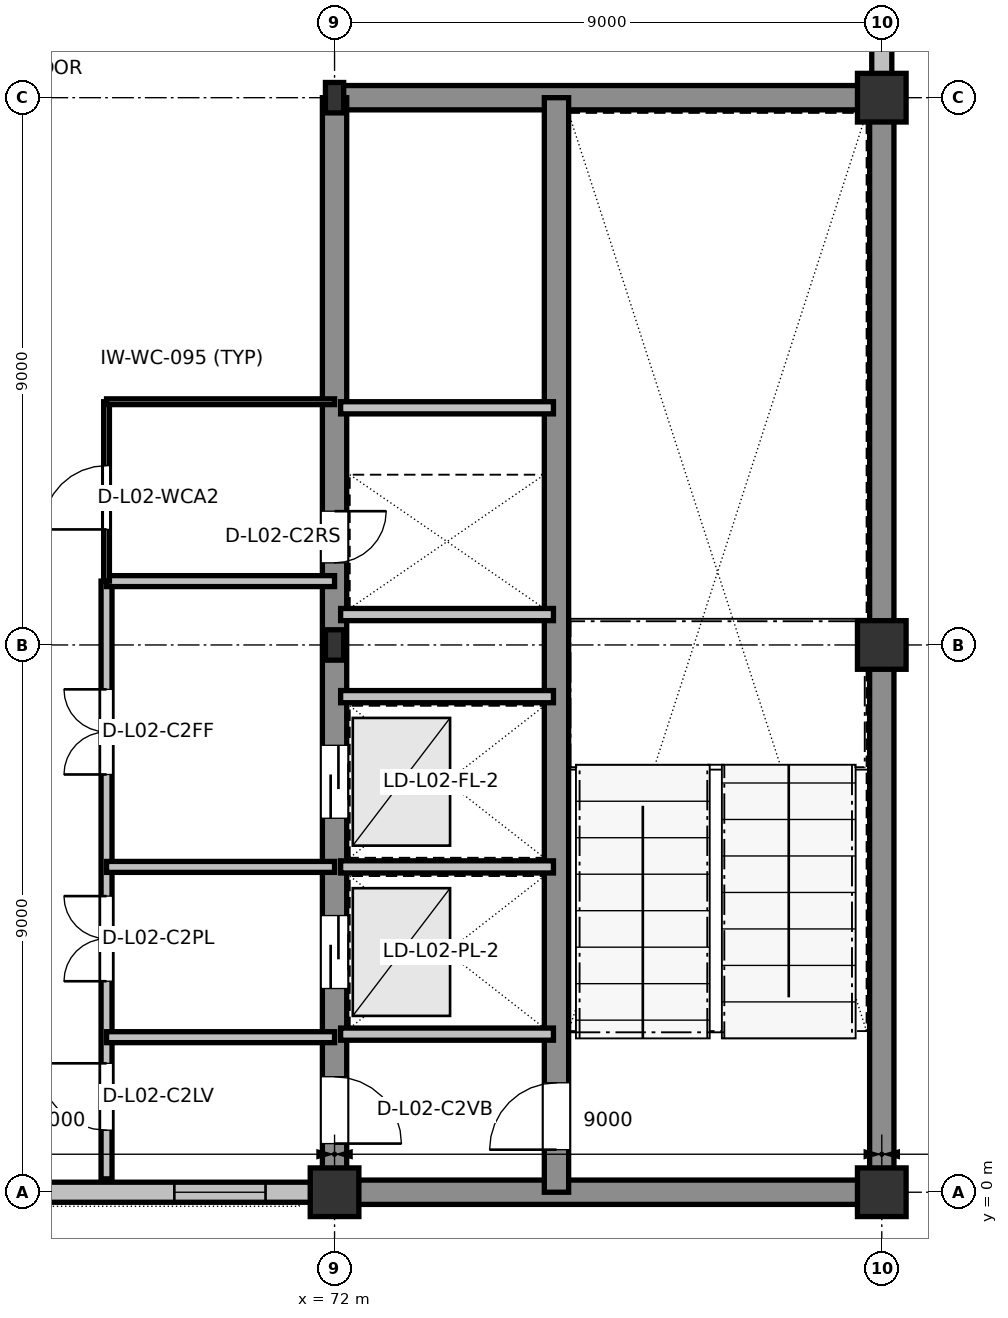
"""IFC4 building model, lengths in metres.
Left out: names, types, materials, properties, quantities, classifications, styles, units other than length and angle.
Written with IfcOpenShell. Run it as: python <this file> out.ifc"""

import sys

from ifc_helpers import new_model, si_unit, direction, frame, frame_2d, origin, origin_2d, place, context, subcontext, project, spatial, rectangle, i_section, extrude, element, fill, save


model = new_model("IFC4")
c1 = context("Model", 3, precision=1e-05, world=origin(), true_north=direction((0.0, 1.0)))
c2 = subcontext(c1, "Body", "Model", "MODEL_VIEW")
j1 = project(units=[si_unit("LENGTHUNIT", "METRE"), si_unit("PLANEANGLEUNIT", "RADIAN")], contexts=[c1])
p1 = place(None, origin())
s1 = spatial("IfcSite", under=j1, at=p1, CompositionType="ELEMENT")
p2 = place(p1, origin())
s2 = spatial("IfcBuilding", under=s1, at=p2, CompositionType="ELEMENT")
p3 = place(p2, frame((0.0, 0.0, 10.2)))
s3 = spatial("IfcBuildingStorey", under=s2, at=p3, CompositionType="ELEMENT", Elevation=10.2)
p4 = place(p3, frame((72.0, 0.0, 0.0), z_axis=(0.0, 0.0, 1.0), x_axis=(1.0, 0.0, 0.0)))
e1 = element("IfcColumn", 1, at=p4, inside=s3, PredefinedType="COLUMN", context=c2, shape_type="SweptSolid", body=[
    extrude(rectangle(XDim=0.8, YDim=0.8, at=origin_2d()), origin(), (0.0, 0.0, 1.0), 4.8),
])
for number, where, z_axis, x_axis in (
    (2, (72.0, 9.0, 0.0), (0.0, 0.0, 1.0), (1.0, 0.0, 0.0)),
    (3, (72.0, 18.0, 0.0), (0.0, 0.0, 1.0), (1.0, 0.0, 0.0)),
):
    element("IfcColumn", number, at=place(p3, frame(where, z_axis=z_axis, x_axis=x_axis)), inside=s3, PredefinedType="COLUMN", context=c2, shape_type="SweptSolid", body=[
        extrude(i_section(OverallWidth=0.3, OverallDepth=0.5, WebThickness=0.014, FlangeThickness=0.028, at=origin_2d()), origin(), (0.0, 0.0, 1.0), 4.8),
    ])
for number, where, z_axis, x_axis in (
    (4, (81.0, 0.0, 0.0), (0.0, 0.0, 1.0), (1.0, 0.0, 0.0)),
    (5, (81.0, 9.0, 0.0), (0.0, 0.0, 1.0), (1.0, 0.0, 0.0)),
    (6, (81.0, 18.0, 0.0), (0.0, 0.0, 1.0), (1.0, 0.0, 0.0)),
):
    element("IfcColumn", number, at=place(p3, frame(where, z_axis=z_axis, x_axis=x_axis)), inside=s3, PredefinedType="COLUMN", context=c2, shape_type="SweptSolid", body=[
        extrude(rectangle(XDim=0.8, YDim=0.8, at=origin_2d()), origin(), (0.0, 0.0, 1.0), 4.8),
    ])
p5 = place(p3, frame((63.385, 0.0, 0.0), z_axis=(0.0, 0.0, 1.0), x_axis=(1.0, 0.0, 0.0)))
e7 = element("IfcWall", 7, at=p5, inside=s3, PredefinedType="STANDARD", context=c2, shape_type="SweptSolid", body=[
    extrude(rectangle(XDim=8.23, YDim=0.33, at=frame_2d((4.115, 0.0))), origin(), (0.0, 0.0, 1.0), 4.235),
])
p6 = place(p5, frame((5.98, 0.0, 0.9)))
e8 = element("IfcOpeningElement", 8, at=p6, cuts=e7, PredefinedType="OPENING", context=c2, shape_type="SweptSolid", body=[
    extrude(rectangle(XDim=1.5, YDim=2.2, at=frame_2d((0.75, 1.1))), frame((0.0, 0.175, 0.0), z_axis=(0.0, -1.0, 0.0), x_axis=(1.0, 0.0, 0.0)), (0.0, 0.0, 1.0), 0.35),
])
p7 = place(p3, frame((81.0, 18.385, 0.0), z_axis=(0.0, 0.0, 1.0), x_axis=(0.0, 1.0, 0.0)))
e9 = element("IfcWall", 9, at=p7, inside=s3, PredefinedType="STANDARD", context=c2, shape_type="SweptSolid", body=[
    extrude(rectangle(XDim=2.69, YDim=0.33, at=frame_2d((1.345, 0.0))), origin(), (0.0, 0.0, 1.0), 4.54),
])
p8 = place(p3, frame((72.0, 0.0, 0.0), z_axis=(0.0, 0.0, 1.0), x_axis=(1.0, 0.0, 0.0)))
e10 = element("IfcWall", 10, at=p8, inside=s3, PredefinedType="SHEAR", context=c2, shape_type="SweptSolid", body=[
    extrude(rectangle(XDim=9.0, YDim=0.4, at=frame_2d((4.5, 0.0))), origin(), (0.0, 0.0, 1.0), 4.56),
])
p9 = place(p3, frame((81.0, 0.0, 0.0), z_axis=(0.0, 0.0, 1.0), x_axis=(0.0, 1.0, 0.0)))
e11 = element("IfcWall", 11, at=p9, inside=s3, PredefinedType="SHEAR", context=c2, shape_type="SweptSolid", body=[
    extrude(rectangle(XDim=18.0, YDim=0.4, at=frame_2d((9.0, 0.0))), origin(), (0.0, 0.0, 1.0), 4.56),
])
p10 = place(p3, frame((81.0, 18.0, 0.0), z_axis=(0.0, 0.0, 1.0), x_axis=(-1.0, 0.0, 0.0)))
e12 = element("IfcWall", 12, at=p10, inside=s3, PredefinedType="SHEAR", context=c2, shape_type="SweptSolid", body=[
    extrude(rectangle(XDim=9.0, YDim=0.4, at=frame_2d((4.5, 0.0))), origin(), (0.0, 0.0, 1.0), 4.56),
])
p11 = place(p3, frame((72.0, 18.0, 0.0), z_axis=(0.0, 0.0, 1.0), x_axis=(0.0, -1.0, 0.0)))
e13 = element("IfcWall", 13, at=p11, inside=s3, PredefinedType="SHEAR", context=c2, shape_type="SweptSolid", body=[
    extrude(rectangle(XDim=18.0, YDim=0.4, at=frame_2d((9.0, 0.0))), origin(), (0.0, 0.0, 1.0), 4.56),
])
p12 = place(p11, frame((16.1, 0.0, 0.0)))
e14 = element("IfcOpeningElement", 14, at=p12, cuts=e13, PredefinedType="OPENING", context=c2, shape_type="SweptSolid", body=[
    extrude(rectangle(XDim=1.1, YDim=2.16, at=frame_2d((0.55, 1.08))), frame((0.0, 0.21, 0.0), z_axis=(0.0, -1.0, 0.0), x_axis=(1.0, 0.0, 0.0)), (0.0, 0.0, 1.0), 0.42),
])
p13 = place(p11, frame((13.45, 0.0, 0.0)))
e15 = element("IfcOpeningElement", 15, at=p13, cuts=e13, PredefinedType="OPENING", context=c2, shape_type="SweptSolid", body=[
    extrude(rectangle(XDim=1.2, YDim=2.2, at=frame_2d((0.6, 1.1))), frame((0.0, 0.21, 0.0), z_axis=(0.0, -1.0, 0.0), x_axis=(1.0, 0.0, 0.0)), (0.0, 0.0, 1.0), 0.42),
])
p14 = place(p11, frame((10.65, 0.0, 0.0)))
e16 = element("IfcOpeningElement", 16, at=p14, cuts=e13, PredefinedType="OPENING", context=c2, shape_type="SweptSolid", body=[
    extrude(rectangle(XDim=1.2, YDim=2.2, at=frame_2d((0.6, 1.1))), frame((0.0, 0.21, 0.0), z_axis=(0.0, -1.0, 0.0), x_axis=(1.0, 0.0, 0.0)), (0.0, 0.0, 1.0), 0.42),
])
p15 = place(p11, frame((6.8, 0.0, 0.0)))
e17 = element("IfcOpeningElement", 17, at=p15, cuts=e13, PredefinedType="OPENING", context=c2, shape_type="SweptSolid", body=[
    extrude(rectangle(XDim=0.85, YDim=2.1, at=frame_2d((0.425, 1.05))), frame((0.0, 0.21, 0.0), z_axis=(0.0, -1.0, 0.0), x_axis=(1.0, 0.0, 0.0)), (0.0, 0.0, 1.0), 0.42),
])
p16 = place(p3, frame((75.65, 0.0, 0.0), z_axis=(0.0, 0.0, 1.0), x_axis=(0.0, 1.0, 0.0)))
e18 = element("IfcWall", 18, at=p16, inside=s3, PredefinedType="SHEAR", context=c2, shape_type="SweptSolid", body=[
    extrude(rectangle(XDim=18.0, YDim=0.4, at=frame_2d((9.0, 0.0))), origin(), (0.0, 0.0, 1.0), 4.56),
])
p17 = place(p16, frame((0.7, 0.0, 0.0)))
e19 = element("IfcOpeningElement", 19, at=p17, cuts=e18, PredefinedType="OPENING", context=c2, shape_type="SweptSolid", body=[
    extrude(rectangle(XDim=1.1, YDim=2.16, at=frame_2d((0.55, 1.08))), frame((0.0, 0.21, 0.0), z_axis=(0.0, -1.0, 0.0), x_axis=(1.0, 0.0, 0.0)), (0.0, 0.0, 1.0), 0.42),
])
for number, where, z_axis, x_axis in (
    (20, (72.1, 2.6, 0.0), (0.0, 0.0, 1.0), (1.0, 0.0, 0.0)),
    (21, (72.1, 5.35, 0.0), (0.0, 0.0, 1.0), (1.0, 0.0, 0.0)),
    (22, (72.1, 8.15, 0.0), (0.0, 0.0, 1.0), (1.0, 0.0, 0.0)),
    (23, (72.1, 9.5, 0.0), (0.0, 0.0, 1.0), (1.0, 0.0, 0.0)),
    (24, (72.1, 12.9, 0.0), (0.0, 0.0, 1.0), (1.0, 0.0, 0.0)),
):
    element("IfcWall", number, at=place(p3, frame(where, z_axis=z_axis, x_axis=x_axis)), inside=s3, PredefinedType="PARTITIONING", context=c2, shape_type="SweptSolid", body=[
        extrude(rectangle(XDim=3.5, YDim=0.2, at=frame_2d((1.75, 0.0))), origin(), (0.0, 0.0, 1.0), 4.56),
    ])
p18 = place(p3, frame((68.25, 0.22, 0.0), z_axis=(0.0, 0.0, 1.0), x_axis=(0.0, 1.0, 0.0)))
e25 = element("IfcWall", 25, at=p18, inside=s3, PredefinedType="PARTITIONING", context=c2, shape_type="SweptSolid", body=[
    extrude(rectangle(XDim=9.83, YDim=0.18, at=frame_2d((4.915, 0.0))), origin(), (0.0, 0.0, 1.0), 4.56),
])
p19 = place(p18, frame((0.8, 0.0, 0.0)))
e26 = element("IfcOpeningElement", 26, at=p19, cuts=e25, PredefinedType="OPENING", context=c2, shape_type="SweptSolid", body=[
    extrude(rectangle(XDim=1.1, YDim=2.16, at=frame_2d((0.55, 1.08))), frame((0.0, 0.1, 0.0), z_axis=(0.0, -1.0, 0.0), x_axis=(1.0, 0.0, 0.0)), (0.0, 0.0, 1.0), 0.2),
])
p20 = place(p18, frame((3.25, 0.0, 0.0)))
e27 = element("IfcOpeningElement", 27, at=p20, cuts=e25, PredefinedType="OPENING", context=c2, shape_type="SweptSolid", body=[
    extrude(rectangle(XDim=1.4, YDim=2.2, at=frame_2d((0.7, 1.1))), frame((0.0, 0.1, 0.0), z_axis=(0.0, -1.0, 0.0), x_axis=(1.0, 0.0, 0.0)), (0.0, 0.0, 1.0), 0.2),
])
p21 = place(p18, frame((6.65, 0.0, 0.0)))
e28 = element("IfcOpeningElement", 28, at=p21, cuts=e25, PredefinedType="OPENING", context=c2, shape_type="SweptSolid", body=[
    extrude(rectangle(XDim=1.4, YDim=2.2, at=frame_2d((0.7, 1.1))), frame((0.0, 0.1, 0.0), z_axis=(0.0, -1.0, 0.0), x_axis=(1.0, 0.0, 0.0)), (0.0, 0.0, 1.0), 0.2),
])
for number, where, z_axis, x_axis in (
    (29, (68.25, 2.55, 0.0), (0.0, 0.0, 1.0), (1.0, 0.0, 0.0)),
    (30, (68.25, 5.35, 0.0), (0.0, 0.0, 1.0), (1.0, 0.0, 0.0)),
    (31, (68.25, 10.05, 0.0), (0.0, 0.0, 1.0), (1.0, 0.0, 0.0)),
):
    element("IfcWall", number, at=place(p3, frame(where, z_axis=z_axis, x_axis=x_axis)), inside=s3, PredefinedType="PARTITIONING", context=c2, shape_type="SweptSolid", body=[
        extrude(rectangle(XDim=3.75, YDim=0.18, at=frame_2d((1.875, 0.0))), origin(), (0.0, 0.0, 1.0), 4.56),
    ])
p22 = place(p3, frame((68.25, 10.05, 0.0), z_axis=(0.0, 0.0, 1.0), x_axis=(0.0, 1.0, 0.0)))
e32 = element("IfcWall", 32, at=p22, inside=s3, PredefinedType="PARTITIONING", context=c2, shape_type="SweptSolid", body=[
    extrude(rectangle(XDim=2.95, YDim=0.095, at=frame_2d((1.475, 0.0))), origin(), (0.0, 0.0, 1.0), 4.56),
])
p23 = place(p22, frame((0.85, 0.0, 0.0)))
e33 = element("IfcOpeningElement", 33, at=p23, cuts=e32, PredefinedType="OPENING", context=c2, shape_type="SweptSolid", body=[
    extrude(rectangle(XDim=1.05, YDim=2.13, at=frame_2d((0.525, 1.065))), frame((0.0, 0.057, 0.0), z_axis=(0.0, -1.0, 0.0), x_axis=(1.0, 0.0, 0.0)), (0.0, 0.0, 1.0), 0.115),
])
p24 = place(p3, frame((68.25, 13.0, 0.0), z_axis=(0.0, 0.0, 1.0), x_axis=(1.0, 0.0, 0.0)))
e34 = element("IfcWall", 34, at=p24, inside=s3, PredefinedType="PARTITIONING", context=c2, shape_type="SweptSolid", body=[
    extrude(rectangle(XDim=3.75, YDim=0.095, at=frame_2d((1.875, 0.0))), origin(), (0.0, 0.0, 1.0), 4.56),
])
p25 = place(p6, origin())
e35 = element("IfcWindow", 35, at=p25, inside=s3, PartitioningType="SINGLE_PANEL", PredefinedType="WINDOW", context=c2, shape_type="SweptSolid", body=[
    extrude(rectangle(XDim=1.5, YDim=2.2, at=frame_2d((0.75, 1.1))), frame((0.0, 0.03, 0.0), z_axis=(0.0, -1.0, 0.0), x_axis=(1.0, 0.0, 0.0)), (0.0, 0.0, 1.0), 0.06),
])
fill(e8, e35)
p26 = place(p17, origin())
e36 = element("IfcDoor", 36, at=p26, inside=s3, OperationType="SINGLE_SWING_LEFT", PredefinedType="DOOR", context=c2, shape_type="SweptSolid", body=[
    extrude(rectangle(XDim=1.1, YDim=2.16, at=frame_2d((0.55, 1.08))), frame((0.0, 0.025, 0.0), z_axis=(0.0, -1.0, 0.0), x_axis=(1.0, 0.0, 0.0)), (0.0, 0.0, 1.0), 0.05),
])
fill(e19, e36)
p27 = place(p12, origin())
e37 = element("IfcDoor", 37, at=p27, inside=s3, OperationType="SINGLE_SWING_RIGHT", PredefinedType="DOOR", context=c2, shape_type="SweptSolid", body=[
    extrude(rectangle(XDim=1.1, YDim=2.16, at=frame_2d((0.55, 1.08))), frame((0.0, 0.025, 0.0), z_axis=(0.0, -1.0, 0.0), x_axis=(1.0, 0.0, 0.0)), (0.0, 0.0, 1.0), 0.05),
])
fill(e14, e37)
p28 = place(p13, origin())
e38 = element("IfcDoor", 38, at=p28, inside=s3, OperationType="SLIDING_TO_LEFT", PredefinedType="DOOR", context=c2, shape_type="SweptSolid", body=[
    extrude(rectangle(XDim=1.2, YDim=2.2, at=frame_2d((0.6, 1.1))), frame((0.0, 0.025, 0.0), z_axis=(0.0, -1.0, 0.0), x_axis=(1.0, 0.0, 0.0)), (0.0, 0.0, 1.0), 0.05),
])
fill(e15, e38)
p29 = place(p14, origin())
e39 = element("IfcDoor", 39, at=p29, inside=s3, OperationType="SLIDING_TO_LEFT", PredefinedType="DOOR", context=c2, shape_type="SweptSolid", body=[
    extrude(rectangle(XDim=1.2, YDim=2.2, at=frame_2d((0.6, 1.1))), frame((0.0, 0.025, 0.0), z_axis=(0.0, -1.0, 0.0), x_axis=(1.0, 0.0, 0.0)), (0.0, 0.0, 1.0), 0.05),
])
fill(e16, e39)
p30 = place(p15, origin())
e40 = element("IfcDoor", 40, at=p30, inside=s3, OperationType="SINGLE_SWING_LEFT", PredefinedType="DOOR", context=c2, shape_type="SweptSolid", body=[
    extrude(rectangle(XDim=0.85, YDim=2.1, at=frame_2d((0.425, 1.05))), frame((0.0, 0.025, 0.0), z_axis=(0.0, -1.0, 0.0), x_axis=(1.0, 0.0, 0.0)), (0.0, 0.0, 1.0), 0.05),
])
fill(e17, e40)
p31 = place(p19, origin())
e41 = element("IfcDoor", 41, at=p31, inside=s3, OperationType="SINGLE_SWING_RIGHT", PredefinedType="DOOR", context=c2, shape_type="SweptSolid", body=[
    extrude(rectangle(XDim=1.1, YDim=2.16, at=frame_2d((0.55, 1.08))), frame((0.0, 0.025, 0.0), z_axis=(0.0, -1.0, 0.0), x_axis=(1.0, 0.0, 0.0)), (0.0, 0.0, 1.0), 0.05),
])
fill(e26, e41)
p32 = place(p20, origin())
e42 = element("IfcDoor", 42, at=p32, inside=s3, OperationType="DOUBLE_DOOR_SINGLE_SWING", PredefinedType="DOOR", context=c2, shape_type="SweptSolid", body=[
    extrude(rectangle(XDim=1.4, YDim=2.2, at=frame_2d((0.7, 1.1))), frame((0.0, 0.025, 0.0), z_axis=(0.0, -1.0, 0.0), x_axis=(1.0, 0.0, 0.0)), (0.0, 0.0, 1.0), 0.05),
])
fill(e27, e42)
p33 = place(p21, origin())
e43 = element("IfcDoor", 43, at=p33, inside=s3, OperationType="DOUBLE_DOOR_SINGLE_SWING", PredefinedType="DOOR", context=c2, shape_type="SweptSolid", body=[
    extrude(rectangle(XDim=1.4, YDim=2.2, at=frame_2d((0.7, 1.1))), frame((0.0, 0.025, 0.0), z_axis=(0.0, -1.0, 0.0), x_axis=(1.0, 0.0, 0.0)), (0.0, 0.0, 1.0), 0.05),
])
fill(e28, e43)
p34 = place(p23, origin())
e44 = element("IfcDoor", 44, at=p34, inside=s3, OperationType="SINGLE_SWING_LEFT", PredefinedType="DOOR", context=c2, shape_type="SweptSolid", body=[
    extrude(rectangle(XDim=1.05, YDim=2.13, at=frame_2d((0.525, 1.065))), frame((0.0, 0.025, 0.0), z_axis=(0.0, -1.0, 0.0), x_axis=(1.0, 0.0, 0.0)), (0.0, 0.0, 1.0), 0.05),
])
fill(e33, e44)
save(model, sys.argv[1])
